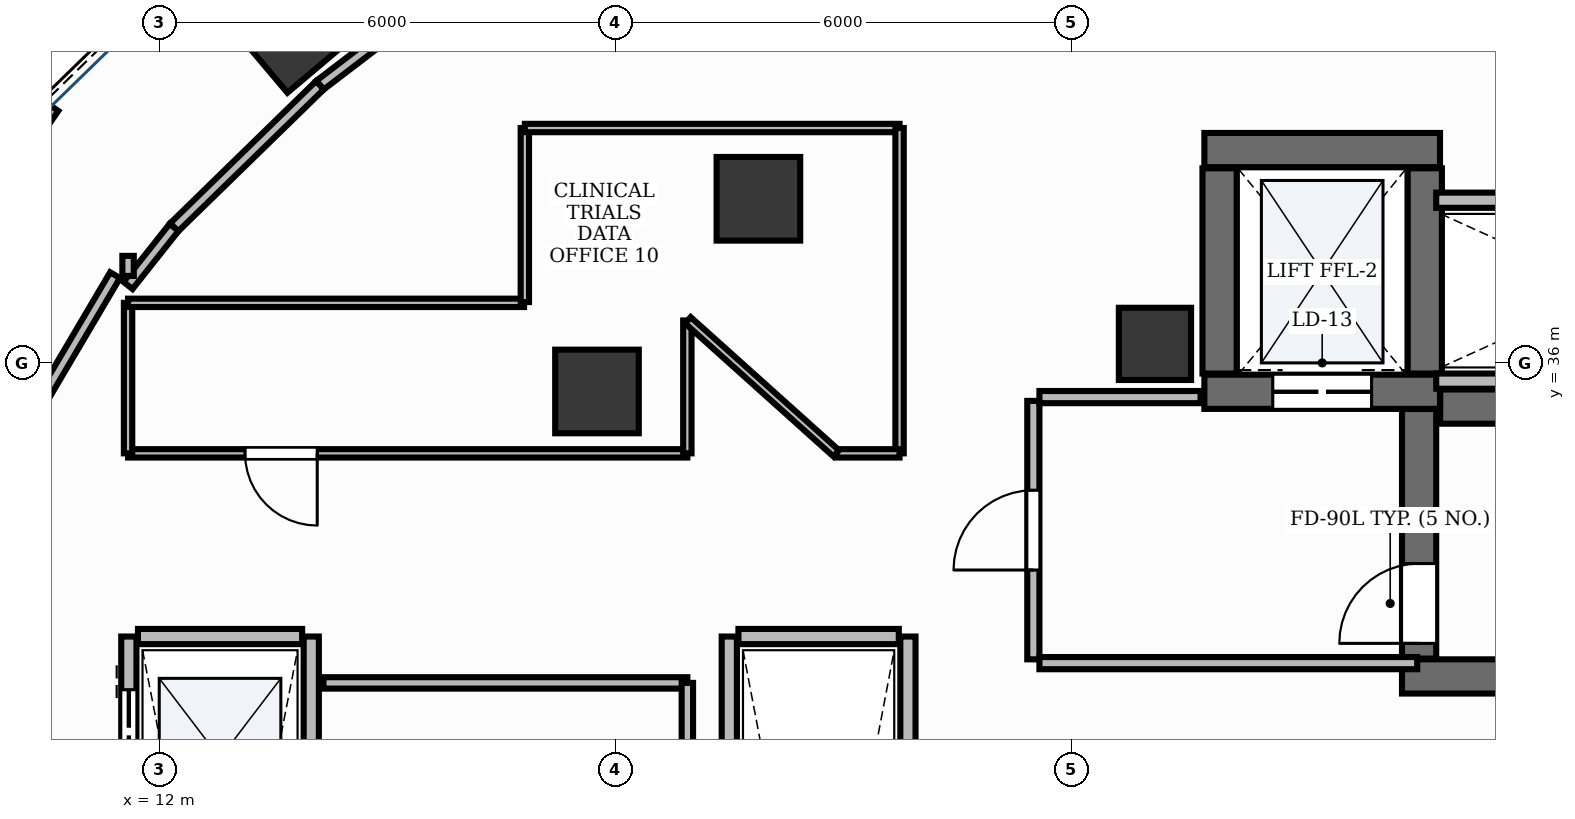
"""IFC4 building model, lengths in metres.
Left out: names, types, materials, properties, quantities, classifications, styles, units other than length and angle.
Written with IfcOpenShell. Run it as: python <this file> out.ifc"""

import sys

from ifc_helpers import new_model, si_unit, direction, frame, frame_2d, origin, origin_2d, place, context, subcontext, project, spatial, rectangle, extrude, element, fill, save


model = new_model("IFC4")
c1 = context("Model", 3, precision=1e-05, world=origin(), true_north=direction((0.0, 1.0)))
c2 = subcontext(c1, "Body", "Model", "MODEL_VIEW")
j1 = project(units=[si_unit("LENGTHUNIT", "METRE"), si_unit("PLANEANGLEUNIT", "RADIAN")], contexts=[c1])
p1 = place(None, origin())
s1 = spatial("IfcSite", under=j1, at=p1, CompositionType="ELEMENT")
p2 = place(p1, origin())
s2 = spatial("IfcBuilding", under=s1, at=p2, CompositionType="ELEMENT")
p3 = place(p2, frame((0.0, 0.0, 140.4)))
s3 = spatial("IfcBuildingStorey", under=s2, at=p3, CompositionType="ELEMENT", Elevation=140.4)
p4 = place(p3, frame((28.852, 35.425, 0.0), z_axis=(0.0, 0.0, 1.0), x_axis=(1.0, 0.0, 0.0)))
e1 = element("IfcWall", 1, at=p4, inside=s3, PredefinedType="SHEAR", context=c2, shape_type="SweptSolid", body=[
    extrude(rectangle(XDim=8.248, YDim=0.45, at=frame_2d((4.124, 0.0))), origin(), (0.0, 0.0, 1.0), 3.9),
])
p5 = place(p3, frame((28.35, 31.875, 0.0), z_axis=(0.0, 0.0, 1.0), x_axis=(1.0, 0.0, 0.0)))
e2 = element("IfcWall", 2, at=p5, inside=s3, PredefinedType="SHEAR", context=c2, shape_type="SweptSolid", body=[
    extrude(rectangle(XDim=8.75, YDim=0.45, at=frame_2d((4.375, 0.0))), origin(), (0.0, 0.0, 1.0), 3.9),
])
p6 = place(p3, frame((28.575, 32.11, 0.0), z_axis=(0.0, 0.0, 1.0), x_axis=(0.0, 1.0, 0.0)))
e3 = element("IfcWall", 3, at=p6, inside=s3, PredefinedType="SHEAR", context=c2, shape_type="SweptSolid", body=[
    extrude(rectangle(XDim=3.283, YDim=0.45, at=frame_2d((1.642, 0.0))), origin(), (0.0, 0.0, 1.0), 3.9),
])
p7 = place(p6, frame((0.2, 0.0, 0.0)))
e4 = element("IfcOpeningElement", 4, at=p7, cuts=e3, PredefinedType="OPENING", context=c2, shape_type="SweptSolid", body=[
    extrude(rectangle(XDim=1.05, YDim=2.15, at=frame_2d((0.525, 1.075))), frame((0.0, 0.24, 0.0), z_axis=(0.0, -1.0, 0.0), x_axis=(1.0, 0.0, 0.0)), (0.0, 0.0, 1.0), 0.48),
])
p8 = place(p3, frame((25.75, 38.8, 0.0), z_axis=(0.0, 0.0, 1.0), x_axis=(1.0, 0.0, 0.0)))
e5 = element("IfcWall", 5, at=p8, inside=s3, PredefinedType="SHEAR", context=c2, shape_type="SweptSolid", body=[
    extrude(rectangle(XDim=3.1, YDim=0.45, at=frame_2d((1.55, 0.0))), origin(), (0.0, 0.0, 1.0), 3.9),
])
p9 = place(p3, frame((25.75, 35.62, 0.0), z_axis=(0.0, 0.0, 1.0), x_axis=(1.0, 0.0, 0.0)))
e6 = element("IfcWall", 6, at=p9, inside=s3, PredefinedType="SHEAR", context=c2, shape_type="SweptSolid", body=[
    extrude(rectangle(XDim=3.1, YDim=0.45, at=frame_2d((1.55, 0.0))), origin(), (0.0, 0.0, 1.0), 3.9),
])
p10 = place(p9, frame((0.9, 0.0, 0.0)))
e7 = element("IfcOpeningElement", 7, at=p10, cuts=e6, PredefinedType="OPENING", context=c2, shape_type="SweptSolid", body=[
    extrude(rectangle(XDim=1.3, YDim=2.2, at=frame_2d((0.65, 1.1))), frame((0.0, 0.24, 0.0), z_axis=(0.0, -1.0, 0.0), x_axis=(1.0, 0.0, 0.0)), (0.0, 0.0, 1.0), 0.48),
])
for number, where, z_axis, x_axis in (
    (8, (25.95, 35.86, 0.0), (0.0, 0.0, 1.0), (0.0, 1.0, 0.0)),
    (9, (28.65, 35.86, 0.0), (0.0, 0.0, 1.0), (0.0, 1.0, 0.0)),
):
    element("IfcWall", number, at=place(p3, frame(where, z_axis=z_axis, x_axis=x_axis)), inside=s3, PredefinedType="SHEAR", context=c2, shape_type="SweptSolid", body=[
        extrude(rectangle(XDim=2.7, YDim=0.45, at=frame_2d((1.35, 0.0))), origin(), (0.0, 0.0, 1.0), 3.9),
    ])
p11 = place(p3, frame((25.1, 36.25, -0.0), z_axis=(0.0, 0.0, 1.0), x_axis=(1.0, 0.0, 0.0)))
e10 = element("IfcColumn", 10, at=p11, inside=s3, PredefinedType="PILASTER", context=c2, shape_type="SweptSolid", body=[
    extrude(rectangle(XDim=0.95, YDim=0.95, at=origin_2d()), origin(), (0.0, 0.0, 1.0), 3.901),
])
p12 = place(p3, frame((13.758, 40.4, -0.0), z_axis=(0.0, 0.0, 1.0), x_axis=(0.764246456939, 0.644924300253, 0.0)))
e11 = element("IfcColumn", 11, at=p12, inside=s3, PredefinedType="COLUMN", context=c2, shape_type="SweptSolid", body=[
    extrude(rectangle(XDim=1.2, YDim=1.2, at=origin_2d()), origin(), (0.0, 0.0, 1.0), 3.901),
])
for number, where, z_axis, x_axis in (
    (12, (19.883, 38.159, -0.0), (0.0, 0.0, 1.0), (1.0, 0.0, 0.0)),
    (13, (17.759, 35.624, -0.0), (0.0, 0.0, 1.0), (1.0, 0.0, 0.0)),
):
    element("IfcColumn", number, at=place(p3, frame(where, z_axis=z_axis, x_axis=x_axis)), inside=s3, PredefinedType="COLUMN", context=c2, shape_type="SweptSolid", body=[
        extrude(rectangle(XDim=1.1, YDim=1.1, at=origin_2d()), origin(), (0.0, 0.0, 1.0), 3.901),
    ])
p13 = place(p3, frame((10.548, 39.4, 0.0), z_axis=(0.0, 0.0, 1.0), x_axis=(-0.566825798999, -0.823837674296, 0.0)))
e14 = element("IfcWall", 14, at=p13, inside=s3, PredefinedType="STANDARD", context=c2, shape_type="SweptSolid", body=[
    extrude(rectangle(XDim=5.826, YDim=0.3, at=frame_2d((2.913, 0.0))), origin(), (0.0, 0.0, 1.0), 3.47),
])
p14 = place(p3, frame((11.6, 21.6, 0.0), z_axis=(0.0, 0.0, 1.0), x_axis=(0.0, 1.0, 0.0)))
e15 = element("IfcWall", 15, at=p14, inside=s3, PredefinedType="PARTITIONING", context=c2, shape_type="SweptSolid", body=[
    extrude(rectangle(XDim=10.8, YDim=0.2, at=frame_2d((5.4, 0.0))), origin(), (0.0, 0.0, 1.0), 2.91),
])
p15 = place(p14, frame((0.9, 0.0, 0.0)))
e16 = element("IfcOpeningElement", 16, at=p15, cuts=e15, PredefinedType="OPENING", context=c2, shape_type="SweptSolid", body=[
    extrude(rectangle(XDim=1.1, YDim=2.2, at=frame_2d((0.55, 1.1))), frame((0.0, 0.115, 0.0), z_axis=(0.0, -1.0, 0.0), x_axis=(1.0, 0.0, 0.0)), (0.0, 0.0, 1.0), 0.23),
])
p16 = place(p14, frame((3.6, 0.0, 0.0)))
e17 = element("IfcOpeningElement", 17, at=p16, cuts=e15, PredefinedType="OPENING", context=c2, shape_type="SweptSolid", body=[
    extrude(rectangle(XDim=1.1, YDim=2.2, at=frame_2d((0.55, 1.1))), frame((0.0, 0.115, 0.0), z_axis=(0.0, -1.0, 0.0), x_axis=(1.0, 0.0, 0.0)), (0.0, 0.0, 1.0), 0.23),
])
p17 = place(p14, frame((6.3, 0.0, 0.0)))
e18 = element("IfcOpeningElement", 18, at=p17, cuts=e15, PredefinedType="OPENING", context=c2, shape_type="SweptSolid", body=[
    extrude(rectangle(XDim=1.1, YDim=2.2, at=frame_2d((0.55, 1.1))), frame((0.0, 0.115, 0.0), z_axis=(0.0, -1.0, 0.0), x_axis=(1.0, 0.0, 0.0)), (0.0, 0.0, 1.0), 0.23),
])
p18 = place(p14, frame((9.0, 0.0, 0.0)))
e19 = element("IfcOpeningElement", 19, at=p18, cuts=e15, PredefinedType="OPENING", context=c2, shape_type="SweptSolid", body=[
    extrude(rectangle(XDim=1.1, YDim=2.2, at=frame_2d((0.55, 1.1))), frame((0.0, 0.115, 0.0), z_axis=(0.0, -1.0, 0.0), x_axis=(1.0, 0.0, 0.0)), (0.0, 0.0, 1.0), 0.23),
])
p19 = place(p3, frame((14.0, 21.6, 0.0), z_axis=(0.0, 0.0, 1.0), x_axis=(0.0, 1.0, 0.0)))
e20 = element("IfcWall", 20, at=p19, inside=s3, PredefinedType="PARTITIONING", context=c2, shape_type="SweptSolid", body=[
    extrude(rectangle(XDim=10.8, YDim=0.2, at=frame_2d((5.4, 0.0))), origin(), (0.0, 0.0, 1.0), 2.91),
])
p20 = place(p3, frame((11.72, 32.4, 0.0), z_axis=(0.0, 0.0, 1.0), x_axis=(1.0, 0.0, 0.0)))
e21 = element("IfcWall", 21, at=p20, inside=s3, PredefinedType="PARTITIONING", context=c2, shape_type="SweptSolid", body=[
    extrude(rectangle(XDim=2.16, YDim=0.2, at=frame_2d((1.08, 0.0))), origin(), (0.0, 0.0, 1.0), 2.91),
])
for number, where, z_axis, x_axis in (
    (22, (19.5, 21.6, 0.0), (0.0, 0.0, 1.0), (0.0, 1.0, 0.0)),
    (23, (21.85, 21.6, 0.0), (0.0, 0.0, 1.0), (0.0, 1.0, 0.0)),
):
    element("IfcWall", number, at=place(p3, frame(where, z_axis=z_axis, x_axis=x_axis)), inside=s3, PredefinedType="PARTITIONING", context=c2, shape_type="SweptSolid", body=[
        extrude(rectangle(XDim=10.8, YDim=0.2, at=frame_2d((5.4, 0.0))), origin(), (0.0, 0.0, 1.0), 2.91),
    ])
p21 = place(p3, frame((19.62, 32.4, 0.0), z_axis=(0.0, 0.0, 1.0), x_axis=(1.0, 0.0, 0.0)))
e24 = element("IfcWall", 24, at=p21, inside=s3, PredefinedType="PARTITIONING", context=c2, shape_type="SweptSolid", body=[
    extrude(rectangle(XDim=2.11, YDim=0.2, at=frame_2d((1.055, 0.0))), origin(), (0.0, 0.0, 1.0), 2.91),
])
for number, where, z_axis, x_axis in (
    (25, (28.8, 35.76, 0.0), (0.0, 0.0, 1.0), (1.0, 0.0, 0.0)),
    (26, (28.8, 38.14, 0.0), (0.0, 0.0, 1.0), (1.0, 0.0, 0.0)),
):
    element("IfcWall", number, at=place(p3, frame(where, z_axis=z_axis, x_axis=x_axis)), inside=s3, PredefinedType="PARTITIONING", context=c2, shape_type="SweptSolid", body=[
        extrude(rectangle(XDim=4.57, YDim=0.2, at=frame_2d((2.285, 0.0))), origin(), (0.0, 0.0, 1.0), 2.91),
    ])
p22 = place(p3, frame((23.5, 32.1, 0.0), z_axis=(0.0, 0.0, 1.0), x_axis=(0.0, 1.0, 0.0)))
e27 = element("IfcWall", 27, at=p22, inside=s3, PredefinedType="PARTITIONING", context=c2, shape_type="SweptSolid", body=[
    extrude(rectangle(XDim=3.4, YDim=0.16, at=frame_2d((1.7, 0.0))), origin(), (0.0, 0.0, 1.0), 2.91),
])
p23 = place(p22, frame((1.175, 0.0, 0.0)))
e28 = element("IfcOpeningElement", 28, at=p23, cuts=e27, PredefinedType="OPENING", context=c2, shape_type="SweptSolid", body=[
    extrude(rectangle(XDim=1.05, YDim=2.15, at=frame_2d((0.525, 1.075))), frame((0.0, 0.095, 0.0), z_axis=(0.0, -1.0, 0.0), x_axis=(1.0, 0.0, 0.0)), (0.0, 0.0, 1.0), 0.19),
])
p24 = place(p3, frame((23.58, 32.05, 0.0), z_axis=(0.0, 0.0, 1.0), x_axis=(1.0, 0.0, 0.0)))
e29 = element("IfcWall", 29, at=p24, inside=s3, PredefinedType="PARTITIONING", context=c2, shape_type="SweptSolid", body=[
    extrude(rectangle(XDim=4.97, YDim=0.16, at=frame_2d((2.485, 0.0))), origin(), (0.0, 0.0, 1.0), 2.91),
])
p25 = place(p3, frame((23.58, 35.55, 0.0), z_axis=(0.0, 0.0, 1.0), x_axis=(1.0, 0.0, 0.0)))
e30 = element("IfcWall", 30, at=p25, inside=s3, PredefinedType="PARTITIONING", context=c2, shape_type="SweptSolid", body=[
    extrude(rectangle(XDim=2.12, YDim=0.16, at=frame_2d((1.06, 0.0))), origin(), (0.0, 0.0, 1.0), 2.91),
])
p26 = place(p3, frame((18.948, 34.81, 0.0), z_axis=(0.0, 0.0, 1.0), x_axis=(-1.0, 0.0, 0.0)))
e31 = element("IfcWall", 31, at=p26, inside=s3, PredefinedType="MOVABLE", context=c2, shape_type="SweptSolid", body=[
    extrude(rectangle(XDim=7.358, YDim=0.11, at=frame_2d((3.679, 0.0))), origin(), (0.0, 0.0, 1.0), 2.91),
])
p27 = place(p26, frame((4.869, 0.0, 0.0)))
e32 = element("IfcOpeningElement", 32, at=p27, cuts=e31, PredefinedType="OPENING", context=c2, shape_type="SweptSolid", body=[
    extrude(rectangle(XDim=0.95, YDim=2.15, at=frame_2d((0.475, 1.075))), frame((0.0, 0.07, 0.0), z_axis=(0.0, -1.0, 0.0), x_axis=(1.0, 0.0, 0.0)), (0.0, 0.0, 1.0), 0.14),
])
p28 = place(p3, frame((14.16, 31.79, 0.0), z_axis=(0.0, 0.0, 1.0), x_axis=(1.0, 0.0, 0.0)))
e33 = element("IfcWall", 33, at=p28, inside=s3, PredefinedType="PARTITIONING", context=c2, shape_type="SweptSolid", body=[
    extrude(rectangle(XDim=4.788, YDim=0.15, at=frame_2d((2.394, 0.0))), origin(), (0.0, 0.0, 1.0), 2.91),
])
p29 = place(p3, frame((18.948, 31.79, 0.0), z_axis=(0.0, 0.0, 1.0), x_axis=(0.0, -1.0, 0.0)))
e34 = element("IfcWall", 34, at=p29, inside=s3, PredefinedType="PARTITIONING", context=c2, shape_type="SweptSolid", body=[
    extrude(rectangle(XDim=0.938, YDim=0.15, at=frame_2d((0.469, 0.0))), origin(), (0.0, 0.0, 1.0), 2.91),
])
p30 = place(p3, frame((16.339, 41.354, 0.0), z_axis=(0.0, 0.0, 1.0), x_axis=(-0.794513779695, -0.607246122981, 0.0)))
e35 = element("IfcWall", 35, at=p30, inside=s3, PredefinedType="PARTITIONING", context=c2, shape_type="SweptSolid", body=[
    extrude(rectangle(XDim=2.799, YDim=0.15, at=frame_2d((1.399, 0.0))), origin(), (0.0, 0.0, 1.0), 2.91),
])
p31 = place(p3, frame((14.114, 39.653, 0.0), z_axis=(0.0, 0.0, 1.0), x_axis=(-0.716161838398, -0.697934252794, 0.0)))
e36 = element("IfcWall", 36, at=p31, inside=s3, PredefinedType="PARTITIONING", context=c2, shape_type="SweptSolid", body=[
    extrude(rectangle(XDim=2.679, YDim=0.15, at=frame_2d((1.339, 0.0))), origin(), (0.0, 0.0, 1.0), 2.91),
])
p32 = place(p3, frame((12.195, 37.782, 0.0), z_axis=(0.0, 0.0, 1.0), x_axis=(-0.621081637991, -0.783745876513, 0.0)))
e37 = element("IfcWall", 37, at=p32, inside=s3, PredefinedType="PARTITIONING", context=c2, shape_type="SweptSolid", body=[
    extrude(rectangle(XDim=0.974, YDim=0.15, at=frame_2d((0.487, 0.0))), origin(), (0.0, 0.0, 1.0), 2.91),
])
p33 = place(p3, frame((11.59, 37.144, 0.0), z_axis=(0.0, 0.0, 1.0), x_axis=(0.0, 1.0, 0.0)))
e38 = element("IfcWall", 38, at=p33, inside=s3, PredefinedType="PARTITIONING", context=c2, shape_type="SweptSolid", body=[
    extrude(rectangle(XDim=0.264, YDim=0.15, at=frame_2d((0.132, 0.0))), origin(), (0.0, 0.0, 1.0), 2.91),
])
p34 = place(p3, frame((11.419, 37.154, 0.0), z_axis=(0.0, 0.0, 1.0), x_axis=(-0.508183269016, -0.861248956511, 0.0)))
e39 = element("IfcWall", 39, at=p34, inside=s3, PredefinedType="PARTITIONING", context=c2, shape_type="SweptSolid", body=[
    extrude(rectangle(XDim=4.053, YDim=0.15, at=frame_2d((2.026, 0.0))), origin(), (0.0, 0.0, 1.0), 2.91),
])
p35 = place(p3, frame((18.948, 36.558, 0.0), z_axis=(0.0, 0.0, 1.0), x_axis=(0.0, -1.0, 0.0)))
e40 = element("IfcWall", 40, at=p35, inside=s3, PredefinedType="MOVABLE", context=c2, shape_type="SweptSolid", body=[
    extrude(rectangle(XDim=1.748, YDim=0.11, at=frame_2d((0.874, 0.0))), origin(), (0.0, 0.0, 1.0), 2.91),
])
p36 = place(p3, frame((11.59, 34.81, 0.0), z_axis=(0.0, 0.0, 1.0), x_axis=(0.0, 1.0, 0.0)))
e41 = element("IfcWall", 41, at=p36, inside=s3, PredefinedType="MOVABLE", context=c2, shape_type="SweptSolid", body=[
    extrude(rectangle(XDim=1.98, YDim=0.11, at=frame_2d((0.99, 0.0))), origin(), (0.0, 0.0, 1.0), 2.91),
])
p37 = place(p3, frame((11.59, 36.79, 0.0), z_axis=(0.0, 0.0, 1.0), x_axis=(1.0, 0.0, 0.0)))
e42 = element("IfcWall", 42, at=p37, inside=s3, PredefinedType="MOVABLE", context=c2, shape_type="SweptSolid", body=[
    extrude(rectangle(XDim=5.21, YDim=0.11, at=frame_2d((2.605, 0.0))), origin(), (0.0, 0.0, 1.0), 2.91),
])
p38 = place(p3, frame((16.81, 36.8, 0.0), z_axis=(0.0, 0.0, 1.0), x_axis=(0.0, 1.0, 0.0)))
e43 = element("IfcWall", 43, at=p38, inside=s3, PredefinedType="MOVABLE", context=c2, shape_type="SweptSolid", body=[
    extrude(rectangle(XDim=2.29, YDim=0.11, at=frame_2d((1.145, 0.0))), origin(), (0.0, 0.0, 1.0), 2.91),
])
p39 = place(p3, frame((16.81, 39.09, 0.0), z_axis=(0.0, 0.0, 1.0), x_axis=(1.0, 0.0, 0.0)))
e44 = element("IfcWall", 44, at=p39, inside=s3, PredefinedType="MOVABLE", context=c2, shape_type="SweptSolid", body=[
    extrude(rectangle(XDim=4.93, YDim=0.11, at=frame_2d((2.465, 0.0))), origin(), (0.0, 0.0, 1.0), 2.91),
])
p40 = place(p3, frame((21.74, 39.09, 0.0), z_axis=(0.0, 0.0, 1.0), x_axis=(0.0, -1.0, 0.0)))
e45 = element("IfcWall", 45, at=p40, inside=s3, PredefinedType="MOVABLE", context=c2, shape_type="SweptSolid", body=[
    extrude(rectangle(XDim=4.28, YDim=0.11, at=frame_2d((2.14, 0.0))), origin(), (0.0, 0.0, 1.0), 2.91),
])
p41 = place(p3, frame((21.74, 34.81, 0.0), z_axis=(0.0, 0.0, 1.0), x_axis=(-1.0, 0.0, 0.0)))
e46 = element("IfcWall", 46, at=p41, inside=s3, PredefinedType="MOVABLE", context=c2, shape_type="SweptSolid", body=[
    extrude(rectangle(XDim=0.834, YDim=0.11, at=frame_2d((0.417, 0.0))), origin(), (0.0, 0.0, 1.0), 2.91),
])
p42 = place(p3, frame((20.906, 34.81, 0.0), z_axis=(0.0, 0.0, 1.0), x_axis=(-0.744339592711, 0.667801295838, 0.0)))
e47 = element("IfcWall", 47, at=p42, inside=s3, PredefinedType="MOVABLE", context=c2, shape_type="SweptSolid", body=[
    extrude(rectangle(XDim=2.622, YDim=0.11, at=frame_2d((1.311, 0.0))), origin(), (0.0, 0.0, 1.0), 2.91),
])
p43 = place(p7, origin())
e48 = element("IfcDoor", 48, at=p43, inside=s3, OperationType="SINGLE_SWING_LEFT", PredefinedType="DOOR", context=c2, shape_type="SweptSolid", body=[
    extrude(rectangle(XDim=1.05, YDim=2.15, at=frame_2d((0.525, 1.075))), frame((0.0, 0.025, 0.0), z_axis=(0.0, -1.0, 0.0), x_axis=(1.0, 0.0, 0.0)), (0.0, 0.0, 1.0), 0.05),
])
fill(e4, e48)
p44 = place(p18, origin())
e49 = element("IfcDoor", 49, at=p44, inside=s3, OperationType="DOUBLE_DOOR_SLIDING", PredefinedType="DOOR", context=c2, shape_type="SweptSolid", body=[
    extrude(rectangle(XDim=1.1, YDim=2.2, at=frame_2d((0.55, 1.1))), frame((0.0, 0.025, 0.0), z_axis=(0.0, -1.0, 0.0), x_axis=(1.0, 0.0, 0.0)), (0.0, 0.0, 1.0), 0.05),
])
fill(e19, e49)
p45 = place(p10, origin())
e50 = element("IfcDoor", 50, at=p45, inside=s3, OperationType="DOUBLE_DOOR_SLIDING", PredefinedType="DOOR", context=c2, shape_type="SweptSolid", body=[
    extrude(rectangle(XDim=1.3, YDim=2.2, at=frame_2d((0.65, 1.1))), frame((0.0, 0.025, 0.0), z_axis=(0.0, -1.0, 0.0), x_axis=(1.0, 0.0, 0.0)), (0.0, 0.0, 1.0), 0.05),
])
fill(e7, e50)
p46 = place(p23, origin())
e51 = element("IfcDoor", 51, at=p46, inside=s3, OperationType="SINGLE_SWING_LEFT", PredefinedType="DOOR", context=c2, shape_type="SweptSolid", body=[
    extrude(rectangle(XDim=1.05, YDim=2.15, at=frame_2d((0.525, 1.075))), frame((0.0, 0.025, 0.0), z_axis=(0.0, -1.0, 0.0), x_axis=(1.0, 0.0, 0.0)), (0.0, 0.0, 1.0), 0.05),
])
fill(e28, e51)
p47 = place(p27, origin())
e52 = element("IfcDoor", 52, at=p47, inside=s3, OperationType="SINGLE_SWING_LEFT", PredefinedType="DOOR", context=c2, shape_type="SweptSolid", body=[
    extrude(rectangle(XDim=0.95, YDim=2.15, at=frame_2d((0.475, 1.075))), frame((0.0, 0.025, 0.0), z_axis=(0.0, -1.0, 0.0), x_axis=(1.0, 0.0, 0.0)), (0.0, 0.0, 1.0), 0.05),
])
fill(e32, e52)
save(model, sys.argv[1])
